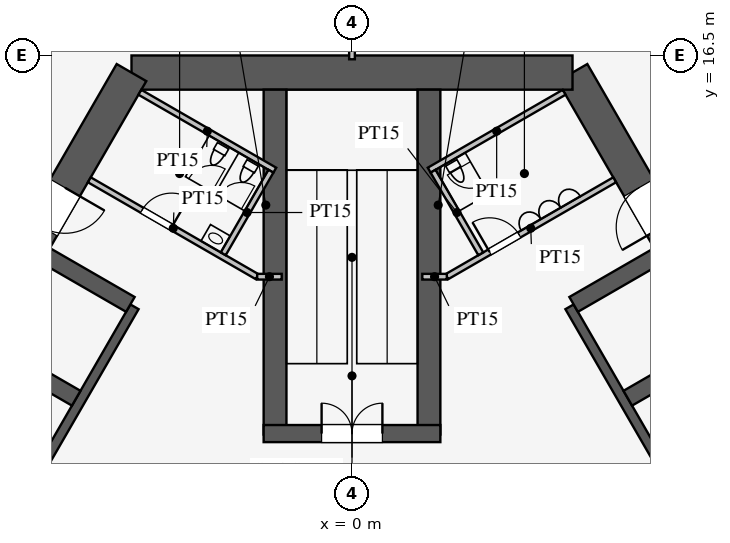
"""IFC4 building model, lengths in metres.
Left out: names, types, materials, properties, quantities, classifications, styles, units other than length and angle.
Written with IfcOpenShell. Run it as: python <this file> out.ifc"""

import sys

from ifc_helpers import new_model, si_unit, direction, frame, frame_2d, origin, place, context, subcontext, project, spatial, rectangle, extrude, element, fill, save


model = new_model("IFC4")
c1 = context("Model", 3, precision=1e-05, world=origin(), true_north=direction((0.0, 1.0)))
c2 = subcontext(c1, "Body", "Model", "MODEL_VIEW")
j1 = project(units=[si_unit("LENGTHUNIT", "METRE"), si_unit("PLANEANGLEUNIT", "RADIAN")], contexts=[c1])
p1 = place(None, origin())
s1 = spatial("IfcSite", under=j1, at=p1, CompositionType="ELEMENT")
p2 = place(p1, origin())
s2 = spatial("IfcBuilding", under=s1, at=p2, CompositionType="ELEMENT")
p3 = place(p2, frame((0.0, 0.0, -6.0)))
s3 = spatial("IfcBuildingStorey", under=s2, at=p3, CompositionType="ELEMENT", Elevation=-6.0)
p4 = place(p3, frame((8.339, 11.656, -0.3), z_axis=(0.0, 0.0, 1.0), x_axis=(-0.499979327182, 0.866037338912, 0.0)))
e1 = element("IfcWall", 1, at=p4, inside=s3, PredefinedType="SHEAR", context=c2, shape_type="SweptSolid", body=[
    extrude(rectangle(XDim=5.073, YDim=0.9, at=frame_2d((2.537, 0.0))), origin(), (0.0, 0.0, 1.0), 6.3),
])
p5 = place(p4, frame((0.375, 0.0, 0.3)))
e2 = element("IfcOpeningElement", 2, at=p5, cuts=e1, PredefinedType="OPENING", context=c2, shape_type="SweptSolid", body=[
    extrude(rectangle(XDim=1.2, YDim=2.1, at=frame_2d((0.6, 1.05))), frame((0.0, 0.46, 0.0), z_axis=(0.0, -1.0, 0.0), x_axis=(1.0, 0.0, 0.0)), (0.0, 0.0, 1.0), 0.92),
])
p6 = place(p3, frame((5.802, 16.05, -0.3), z_axis=(0.0, 0.0, 1.0), x_axis=(-1.0, 0.0, 0.0)))
e3 = element("IfcWall", 3, at=p6, inside=s3, PredefinedType="SHEAR", context=c2, shape_type="SweptSolid", body=[
    extrude(rectangle(XDim=11.605, YDim=0.9, at=frame_2d((5.802, 0.0))), origin(), (0.0, 0.0, 1.0), 6.3),
])
p7 = place(p3, frame((-5.802, 16.05, -0.3), z_axis=(0.0, 0.0, 1.0), x_axis=(-0.499991141822, -0.866030517996, 0.0)))
e4 = element("IfcWall", 4, at=p7, inside=s3, PredefinedType="SHEAR", context=c2, shape_type="SweptSolid", body=[
    extrude(rectangle(XDim=21.997, YDim=0.9, at=frame_2d((10.999, 0.0))), origin(), (0.0, 0.0, 1.0), 6.3),
])
p8 = place(p7, frame((17.299, 0.0, 0.3)))
e5 = element("IfcOpeningElement", 5, at=p8, cuts=e4, PredefinedType="OPENING", context=c2, shape_type="SweptSolid", body=[
    extrude(rectangle(XDim=1.2, YDim=2.1, at=frame_2d((0.6, 1.05))), frame((0.0, 0.46, 0.0), z_axis=(0.0, -1.0, 0.0), x_axis=(1.0, 0.0, 0.0)), (0.0, 0.0, 1.0), 0.92),
])
p9 = place(p7, frame((3.499, 0.0, 0.3)))
e6 = element("IfcOpeningElement", 6, at=p9, cuts=e4, PredefinedType="OPENING", context=c2, shape_type="SweptSolid", body=[
    extrude(rectangle(XDim=1.2, YDim=2.1, at=frame_2d((0.6, 1.05))), frame((0.0, 0.46, 0.0), z_axis=(0.0, -1.0, 0.0), x_axis=(1.0, 0.0, 0.0)), (0.0, 0.0, 1.0), 0.92),
])
p10 = place(p3, frame((11.424, 0.014, -0.3), z_axis=(0.0, 0.0, 1.0), x_axis=(-0.500001763848, 0.866024385424, 0.0)))
e7 = element("IfcWall", 7, at=p10, inside=s3, PredefinedType="SHEAR", context=c2, shape_type="SweptSolid", body=[
    extrude(rectangle(XDim=11.4, YDim=0.25, at=frame_2d((5.7, 0.0))), origin(), (0.0, 0.0, 1.0), 6.3),
])
p11 = place(p3, frame((7.257, 7.481, -0.3), z_axis=(0.0, 0.0, 1.0), x_axis=(0.866044293806, 0.499967280095, 0.0)))
e8 = element("IfcWall", 8, at=p11, inside=s3, PredefinedType="SHEAR", context=c2, shape_type="SweptSolid", body=[
    extrude(rectangle(XDim=4.575, YDim=0.45, at=frame_2d((2.288, 0.0))), origin(), (0.0, 0.0, 1.0), 6.3),
])
p12 = place(p3, frame((5.832, 9.949, -0.3), z_axis=(0.0, 0.0, 1.0), x_axis=(0.866021187218, 0.500007303237, 0.0)))
e9 = element("IfcWall", 9, at=p12, inside=s3, PredefinedType="SHEAR", context=c2, shape_type="SweptSolid", body=[
    extrude(rectangle(XDim=4.575, YDim=0.45, at=frame_2d((2.288, 0.0))), origin(), (0.0, 0.0, 1.0), 6.3),
])
p13 = place(p3, frame((-5.724, 9.886, -1.6), z_axis=(0.0, 0.0, 1.0), x_axis=(-0.500001763848, -0.866024385424, 0.0)))
e10 = element("IfcWall", 10, at=p13, inside=s3, PredefinedType="SHEAR", context=c2, shape_type="SweptSolid", body=[
    extrude(rectangle(XDim=11.4, YDim=0.25, at=frame_2d((5.7, 0.0))), origin(), (0.0, 0.0, 1.0), 7.6),
])
p14 = place(p13, frame((6.525, 0.0, 1.6)))
e11 = element("IfcOpeningElement", 11, at=p14, cuts=e10, PredefinedType="OPENING", context=c2, shape_type="SweptSolid", body=[
    extrude(rectangle(XDim=1.2, YDim=2.2, at=frame_2d((0.6, 1.1))), frame((0.0, 0.135, 0.0), z_axis=(0.0, -1.0, 0.0), x_axis=(1.0, 0.0, 0.0)), (0.0, 0.0, 1.0), 0.27),
])
p15 = place(p13, frame((9.375, 0.0, 1.6)))
e12 = element("IfcOpeningElement", 12, at=p15, cuts=e10, PredefinedType="OPENING", context=c2, shape_type="SweptSolid", body=[
    extrude(rectangle(XDim=1.2, YDim=2.2, at=frame_2d((0.6, 1.1))), frame((0.0, 0.135, 0.0), z_axis=(0.0, -1.0, 0.0), x_axis=(1.0, 0.0, 0.0)), (0.0, 0.0, 1.0), 0.27),
])
p16 = place(p3, frame((-5.832, 9.949, -1.6), z_axis=(0.0, 0.0, 1.0), x_axis=(-0.866029291668, 0.499993265928, 0.0)))
e13 = element("IfcWall", 13, at=p16, inside=s3, PredefinedType="SHEAR", context=c2, shape_type="SweptSolid", body=[
    extrude(rectangle(XDim=2.575, YDim=0.45, at=frame_2d((1.288, 0.0))), origin(), (0.0, 0.0, 1.0), 7.6),
])
p17 = place(p3, frame((-7.257, 7.481, -1.6), z_axis=(0.0, 0.0, 1.0), x_axis=(-0.866046643894, 0.499963209246, 0.0)))
e14 = element("IfcWall", 14, at=p17, inside=s3, PredefinedType="SHEAR", context=c2, shape_type="SweptSolid", body=[
    extrude(rectangle(XDim=2.575, YDim=0.45, at=frame_2d((1.288, 0.0))), origin(), (0.0, 0.0, 1.0), 7.6),
])
for number, where, z_axis, x_axis in (
    (15, (2.025, 6.525, -0.3), (0.0, 0.0, 1.0), (0.0, 1.0, 0.0)),
    (16, (-2.025, 6.525, -0.3), (0.0, 0.0, 1.0), (0.0, 1.0, 0.0)),
):
    element("IfcWall", number, at=place(p3, frame(where, z_axis=z_axis, x_axis=x_axis)), inside=s3, PredefinedType="SHEAR", context=c2, shape_type="SweptSolid", body=[
        extrude(rectangle(XDim=9.075, YDim=0.6, at=frame_2d((4.538, 0.0))), origin(), (0.0, 0.0, 1.0), 6.3),
    ])
p18 = place(p3, frame((2.325, 6.55, -0.3), z_axis=(0.0, 0.0, 1.0), x_axis=(-1.0, 0.0, 0.0)))
e17 = element("IfcWall", 17, at=p18, inside=s3, PredefinedType="SHEAR", context=c2, shape_type="SweptSolid", body=[
    extrude(rectangle(XDim=4.65, YDim=0.45, at=frame_2d((2.325, 0.0))), origin(), (0.0, 0.0, 1.0), 6.3),
])
p19 = place(p18, frame((1.525, 0.0, 0.3)))
e18 = element("IfcOpeningElement", 18, at=p19, cuts=e17, PredefinedType="OPENING", context=c2, shape_type="SweptSolid", body=[
    extrude(rectangle(XDim=1.6, YDim=2.1, at=frame_2d((0.8, 1.05))), frame((0.0, 0.235, 0.0), z_axis=(0.0, -1.0, 0.0), x_axis=(1.0, 0.0, 0.0)), (0.0, 0.0, 1.0), 0.47),
])
p20 = place(p3, frame((2.495, 10.678, 0.0), z_axis=(0.0, 0.0, 1.0), x_axis=(0.86602216432, 0.500005610874, 0.0)))
e19 = element("IfcWall", 19, at=p20, inside=s3, PredefinedType="PARTITIONING", context=c2, shape_type="SweptSolid", body=[
    extrude(rectangle(XDim=5.1, YDim=0.15, at=frame_2d((2.55, 0.0))), origin(), (0.0, 0.0, 1.0), 5.7),
])
p21 = place(p20, frame((1.3, 0.0, 0.0)))
e20 = element("IfcOpeningElement", 20, at=p21, cuts=e19, PredefinedType="OPENING", context=c2, shape_type="SweptSolid", body=[
    extrude(rectangle(XDim=0.9, YDim=2.1, at=frame_2d((0.45, 1.05))), frame((0.0, 0.085, 0.0), z_axis=(0.0, -1.0, 0.0), x_axis=(1.0, 0.0, 0.0)), (0.0, 0.0, 1.0), 0.17),
])
p22 = place(p3, frame((-2.495, 10.678, 0.0), z_axis=(0.0, 0.0, 1.0), x_axis=(-0.86602216432, 0.500005610874, 0.0)))
e21 = element("IfcWall", 21, at=p22, inside=s3, PredefinedType="PARTITIONING", context=c2, shape_type="SweptSolid", body=[
    extrude(rectangle(XDim=5.1, YDim=0.15, at=frame_2d((2.55, 0.0))), origin(), (0.0, 0.0, 1.0), 5.7),
])
p23 = place(p22, frame((2.6, 0.0, 0.0)))
e22 = element("IfcOpeningElement", 22, at=p23, cuts=e21, PredefinedType="OPENING", context=c2, shape_type="SweptSolid", body=[
    extrude(rectangle(XDim=0.9, YDim=2.1, at=frame_2d((0.45, 1.05))), frame((0.0, 0.085, 0.0), z_axis=(0.0, -1.0, 0.0), x_axis=(1.0, 0.0, 0.0)), (0.0, 0.0, 1.0), 0.17),
])
for number, where, z_axis, x_axis in (
    (23, (2.495, 10.678, 0.0), (0.0, 0.0, 1.0), (-1.0, 0.0, 0.0)),
    (24, (-2.495, 10.678, 0.0), (0.0, 0.0, 1.0), (1.0, 0.0, 0.0)),
):
    element("IfcWall", number, at=place(p3, frame(where, z_axis=z_axis, x_axis=x_axis)), inside=s3, PredefinedType="PARTITIONING", context=c2, shape_type="SweptSolid", body=[
        extrude(rectangle(XDim=0.645, YDim=0.15, at=frame_2d((0.323, 0.0))), origin(), (0.0, 0.0, 1.0), 5.7),
    ])
p24 = place(p3, frame((2.031, 13.482, 0.0), z_axis=(0.0, 0.0, 1.0), x_axis=(0.866050731258, 0.499956128963, 0.0)))
e25 = element("IfcWall", 25, at=p24, inside=s3, PredefinedType="PARTITIONING", context=c2, shape_type="SweptSolid", body=[
    extrude(rectangle(XDim=4.1, YDim=0.15, at=frame_2d((2.05, 0.0))), origin(), (0.0, 0.0, 1.0), 5.7),
])
p25 = place(p3, frame((3.389, 11.281, 0.0), z_axis=(0.0, 0.0, 1.0), x_axis=(-0.499989096993, 0.866031698547, 0.0)))
e26 = element("IfcWall", 26, at=p25, inside=s3, PredefinedType="PARTITIONING", context=c2, shape_type="SweptSolid", body=[
    extrude(rectangle(XDim=2.51, YDim=0.15, at=frame_2d((1.255, 0.0))), origin(), (0.0, 0.0, 1.0), 5.7),
])
p26 = place(p3, frame((-2.031, 13.482, 0.0), z_axis=(0.0, 0.0, 1.0), x_axis=(-0.866050731258, 0.499956128963, 0.0)))
e27 = element("IfcWall", 27, at=p26, inside=s3, PredefinedType="PARTITIONING", context=c2, shape_type="SweptSolid", body=[
    extrude(rectangle(XDim=4.1, YDim=0.15, at=frame_2d((2.05, 0.0))), origin(), (0.0, 0.0, 1.0), 5.7),
])
p27 = place(p3, frame((-3.389, 11.281, 0.0), z_axis=(0.0, 0.0, 1.0), x_axis=(0.499989096993, 0.866031698547, 0.0)))
e28 = element("IfcWall", 28, at=p27, inside=s3, PredefinedType="PARTITIONING", context=c2, shape_type="SweptSolid", body=[
    extrude(rectangle(XDim=2.51, YDim=0.15, at=frame_2d((1.255, 0.0))), origin(), (0.0, 0.0, 1.0), 5.7),
])
p28 = place(p3, frame((0.0, 16.4, 0.0), z_axis=(0.0, 0.0, 1.0), x_axis=(0.0, 1.0, 0.0)))
e29 = element("IfcWall", 29, at=p28, inside=s3, PredefinedType="PARTITIONING", context=c2, shape_type="SweptSolid", body=[
    extrude(rectangle(XDim=18.25, YDim=0.15, at=frame_2d((9.125, 0.0))), origin(), (0.0, 0.0, 1.0), 3.7),
])
p29 = place(p21, origin())
e30 = element("IfcDoor", 30, at=p29, inside=s3, OperationType="SINGLE_SWING_LEFT", PredefinedType="DOOR", context=c2, shape_type="SweptSolid", body=[
    extrude(rectangle(XDim=0.9, YDim=2.1, at=frame_2d((0.45, 1.05))), frame((0.0, 0.025, 0.0), z_axis=(0.0, -1.0, 0.0), x_axis=(1.0, 0.0, 0.0)), (0.0, 0.0, 1.0), 0.05),
])
fill(e20, e30)
p30 = place(p23, frame((0.9, 0.0, 0.0), z_axis=(0.0, 0.0, 1.0), x_axis=(-1.0, 0.0, 0.0)))
e31 = element("IfcDoor", 31, at=p30, inside=s3, OperationType="SINGLE_SWING_RIGHT", PredefinedType="DOOR", context=c2, shape_type="SweptSolid", body=[
    extrude(rectangle(XDim=0.9, YDim=2.1, at=frame_2d((0.45, 1.05))), frame((0.0, 0.025, 0.0), z_axis=(0.0, -1.0, 0.0), x_axis=(1.0, 0.0, 0.0)), (0.0, 0.0, 1.0), 0.05),
])
fill(e22, e31)
p31 = place(p19, frame((1.6, 0.0, 0.0), z_axis=(0.0, 0.0, 1.0), x_axis=(-1.0, 0.0, 0.0)))
e32 = element("IfcDoor", 32, at=p31, inside=s3, OperationType="DOUBLE_DOOR_SINGLE_SWING", PredefinedType="DOOR", context=c2, shape_type="SweptSolid", body=[
    extrude(rectangle(XDim=1.6, YDim=2.1, at=frame_2d((0.8, 1.05))), frame((0.0, 0.025, 0.0), z_axis=(0.0, -1.0, 0.0), x_axis=(1.0, 0.0, 0.0)), (0.0, 0.0, 1.0), 0.05),
])
fill(e18, e32)
p32 = place(p5, origin())
e33 = element("IfcDoor", 33, at=p32, inside=s3, OperationType="SINGLE_SWING_LEFT", PredefinedType="DOOR", context=c2, shape_type="SweptSolid", body=[
    extrude(rectangle(XDim=1.2, YDim=2.1, at=frame_2d((0.6, 1.05))), frame((0.0, 0.025, 0.0), z_axis=(0.0, -1.0, 0.0), x_axis=(1.0, 0.0, 0.0)), (0.0, 0.0, 1.0), 0.05),
])
fill(e2, e33)
p33 = place(p9, origin())
e34 = element("IfcDoor", 34, at=p33, inside=s3, OperationType="SINGLE_SWING_LEFT", PredefinedType="DOOR", context=c2, shape_type="SweptSolid", body=[
    extrude(rectangle(XDim=1.2, YDim=2.1, at=frame_2d((0.6, 1.05))), frame((0.0, 0.025, 0.0), z_axis=(0.0, -1.0, 0.0), x_axis=(1.0, 0.0, 0.0)), (0.0, 0.0, 1.0), 0.05),
])
fill(e6, e34)
save(model, sys.argv[1])
